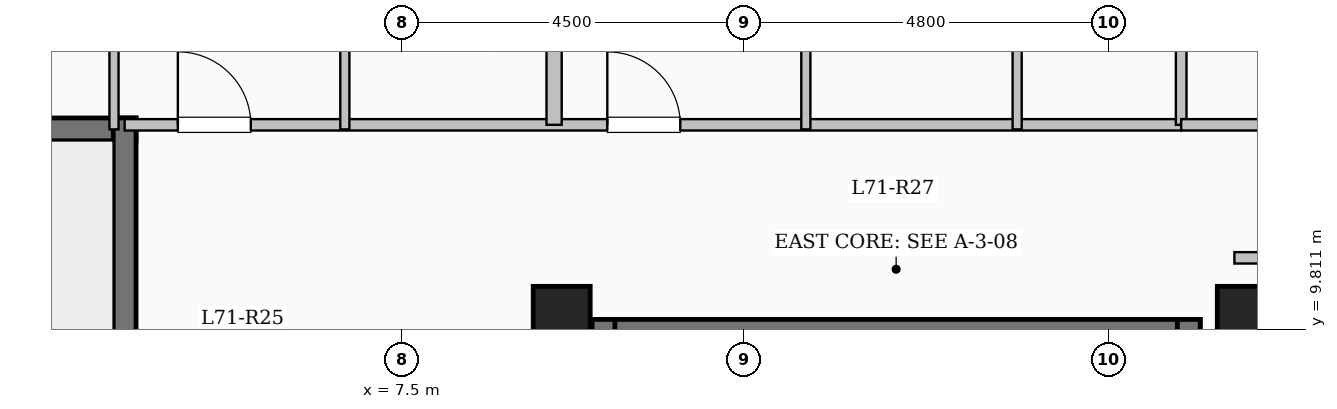
"""IFC4 building model, lengths in metres.
Left out: names, types, materials, properties, quantities, classifications, styles, units other than length and angle.
Written with IfcOpenShell. Run it as: python <this file> out.ifc"""

import sys

from ifc_helpers import new_model, si_unit, direction, frame, frame_2d, origin, origin_2d, place, context, subcontext, project, spatial, rectangle, extrude, element, fill, save


model = new_model("IFC4")
c1 = context("Model", 3, precision=1e-05, world=origin(), true_north=direction((0.0, 1.0)))
c2 = subcontext(c1, "Body", "Model", "MODEL_VIEW")
j1 = project(units=[si_unit("LENGTHUNIT", "METRE"), si_unit("PLANEANGLEUNIT", "RADIAN")], contexts=[c1])
p1 = place(None, origin())
s1 = spatial("IfcSite", under=j1, at=p1, CompositionType="ELEMENT")
p2 = place(p1, origin())
s2 = spatial("IfcBuilding", under=s1, at=p2, CompositionType="ELEMENT")
p3 = place(p2, frame((0.0, 0.0, 261.6)))
s3 = spatial("IfcBuildingStorey", under=s2, at=p3, CompositionType="ELEMENT", Elevation=261.6)
for number, where, z_axis, x_axis in (
    (1, (9.6, 10.0, 0.0), (0.0, 0.0, 1.0), (1.0, 0.0, 0.0)),
    (2, (18.6, 10.0, 0.0), (0.0, 0.0, 1.0), (1.0, 0.0, 0.0)),
):
    element("IfcColumn", number, at=place(p3, frame(where, z_axis=z_axis, x_axis=x_axis)), inside=s3, PredefinedType="COLUMN", context=c2, shape_type="SweptSolid", body=[
        extrude(rectangle(XDim=0.75, YDim=0.75, at=origin_2d()), origin(), (0.0, 0.0, 1.0), 3.35),
    ])
p4 = place(p3, frame((10.0, 9.79, 0.0), z_axis=(0.0, 0.0, 1.0), x_axis=(1.0, 0.0, 0.0)))
e3 = element("IfcWall", 3, at=p4, inside=s3, PredefinedType="SHEAR", context=c2, shape_type="SweptSolid", body=[
    extrude(rectangle(XDim=8.0, YDim=0.3, at=frame_2d((4.0, 0.0))), origin(), (0.0, 0.0, 1.0), 3.35),
])
for number, where, z_axis, x_axis in (
    (4, (10.15, 6.35, 0.0), (0.0, 0.0, 1.0), (0.0, 1.0, 0.0)),
    (5, (17.85, 6.35, 0.0), (0.0, 0.0, 1.0), (0.0, 1.0, 0.0)),
):
    element("IfcWall", number, at=place(p3, frame(where, z_axis=z_axis, x_axis=x_axis)), inside=s3, PredefinedType="SHEAR", context=c2, shape_type="SweptSolid", body=[
        extrude(rectangle(XDim=3.59, YDim=0.3, at=frame_2d((1.795, 0.0))), origin(), (0.0, 0.0, 1.0), 3.35),
    ])
p5 = place(p3, frame((-4.0, 12.44, 0.0), z_axis=(0.0, 0.0, 1.0), x_axis=(1.0, 0.0, 0.0)))
e6 = element("IfcWall", 6, at=p5, inside=s3, PredefinedType="SHEAR", context=c2, shape_type="SweptSolid", body=[
    extrude(rectangle(XDim=8.0, YDim=0.3, at=frame_2d((4.0, 0.0))), origin(), (0.0, 0.0, 1.0), 3.35),
])
p6 = place(p3, frame((3.85, 9.0, 0.0), z_axis=(0.0, 0.0, 1.0), x_axis=(0.0, 1.0, 0.0)))
e7 = element("IfcWall", 7, at=p6, inside=s3, PredefinedType="SHEAR", context=c2, shape_type="SweptSolid", body=[
    extrude(rectangle(XDim=3.59, YDim=0.3, at=frame_2d((1.795, 0.0))), origin(), (0.0, 0.0, 1.0), 3.35),
])
p7 = place(p3, frame((3.85, 12.5, 0.0), z_axis=(0.0, 0.0, 1.0), x_axis=(1.0, 0.0, 0.0)))
e8 = element("IfcWall", 8, at=p7, inside=s3, PredefinedType="PARTITIONING", context=c2, shape_type="SweptSolid", body=[
    extrude(rectangle(XDim=13.9, YDim=0.15, at=frame_2d((6.95, 0.0))), origin(), (0.0, 0.0, 1.0), 3.1),
])
p8 = place(p7, frame((0.7, 0.0, 0.0)))
e9 = element("IfcOpeningElement", 9, at=p8, cuts=e8, PredefinedType="OPENING", context=c2, shape_type="SweptSolid", body=[
    extrude(rectangle(XDim=0.96, YDim=2.15, at=frame_2d((0.48, 1.075))), frame((0.0, 0.085, 0.0), z_axis=(0.0, -1.0, 0.0), x_axis=(1.0, 0.0, 0.0)), (0.0, 0.0, 1.0), 0.17),
])
p9 = place(p7, frame((6.35, 0.0, 0.0)))
e10 = element("IfcOpeningElement", 10, at=p9, cuts=e8, PredefinedType="OPENING", context=c2, shape_type="SweptSolid", body=[
    extrude(rectangle(XDim=0.96, YDim=2.15, at=frame_2d((0.48, 1.075))), frame((0.0, 0.085, 0.0), z_axis=(0.0, -1.0, 0.0), x_axis=(1.0, 0.0, 0.0)), (0.0, 0.0, 1.0), 0.17),
])
p10 = place(p3, frame((9.5, 12.5, 0.0), z_axis=(0.0, 0.0, 1.0), x_axis=(0.0, 1.0, 0.0)))
e11 = element("IfcWall", 11, at=p10, inside=s3, PredefinedType="SOLIDWALL", context=c2, shape_type="SweptSolid", body=[
    extrude(rectangle(XDim=8.77, YDim=0.2, at=frame_2d((4.385, 0.0))), origin(), (0.0, 0.0, 1.0), 3.1),
])
p11 = place(p3, frame((3.71, 12.44, 0.0), z_axis=(0.0, 0.0, 1.0), x_axis=(0.0, 1.0, 0.0)))
e12 = element("IfcWall", 12, at=p11, inside=s3, PredefinedType="PARTITIONING", context=c2, shape_type="SweptSolid", body=[
    extrude(rectangle(XDim=9.94, YDim=0.12, at=frame_2d((4.97, 0.0))), origin(), (0.0, 0.0, 1.0), 3.1),
])
p12 = place(p11, frame((2.735, 0.0, 0.0)))
e13 = element("IfcOpeningElement", 13, at=p12, cuts=e12, PredefinedType="OPENING", context=c2, shape_type="SweptSolid", body=[
    extrude(rectangle(XDim=1.08, YDim=2.15, at=frame_2d((0.54, 1.075))), frame((0.0, 0.07, 0.0), z_axis=(0.0, -1.0, 0.0), x_axis=(1.0, 0.0, 0.0)), (0.0, 0.0, 1.0), 0.14),
])
p13 = place(p3, frame((6.747, 12.44, 0.0), z_axis=(0.0, 0.0, 1.0), x_axis=(0.0, 1.0, 0.0)))
e14 = element("IfcWall", 14, at=p13, inside=s3, PredefinedType="PARTITIONING", context=c2, shape_type="SweptSolid", body=[
    extrude(rectangle(XDim=2.45, YDim=0.12, at=frame_2d((1.225, 0.0))), origin(), (0.0, 0.0, 1.0), 3.1),
])
p14 = place(p3, frame((12.812, 12.44, 0.0), z_axis=(0.0, 0.0, 1.0), x_axis=(0.0, 1.0, 0.0)))
e15 = element("IfcWall", 15, at=p14, inside=s3, PredefinedType="PARTITIONING", context=c2, shape_type="SweptSolid", body=[
    extrude(rectangle(XDim=8.46, YDim=0.12, at=frame_2d((4.23, 0.0))), origin(), (0.0, 0.0, 1.0), 3.1),
])
p15 = place(p14, frame((2.905, 0.0, 0.0)))
e16 = element("IfcOpeningElement", 16, at=p15, cuts=e15, PredefinedType="OPENING", context=c2, shape_type="SweptSolid", body=[
    extrude(rectangle(XDim=1.08, YDim=2.15, at=frame_2d((0.54, 1.075))), frame((0.0, 0.07, 0.0), z_axis=(0.0, -1.0, 0.0), x_axis=(1.0, 0.0, 0.0)), (0.0, 0.0, 1.0), 0.14),
])
p16 = place(p3, frame((15.592, 12.44, 0.0), z_axis=(0.0, 0.0, 1.0), x_axis=(0.0, 1.0, 0.0)))
e17 = element("IfcWall", 17, at=p16, inside=s3, PredefinedType="PARTITIONING", context=c2, shape_type="SweptSolid", body=[
    extrude(rectangle(XDim=2.62, YDim=0.12, at=frame_2d((1.31, 0.0))), origin(), (0.0, 0.0, 1.0), 3.1),
])
p17 = place(p3, frame((18.45, 10.75, 0.0), z_axis=(0.0, 0.0, 1.0), x_axis=(1.0, 0.0, 0.0)))
e18 = element("IfcWall", 18, at=p17, inside=s3, PredefinedType="PARTITIONING", context=c2, shape_type="SweptSolid", body=[
    extrude(rectangle(XDim=4.23, YDim=0.15, at=frame_2d((2.115, 0.0))), origin(), (0.0, 0.0, 1.0), 3.1),
])
p18 = place(p3, frame((17.75, 12.5, 0.0), z_axis=(0.0, 0.0, 1.0), x_axis=(0.0, 1.0, 0.0)))
e19 = element("IfcWall", 19, at=p18, inside=s3, PredefinedType="PARTITIONING", context=c2, shape_type="SweptSolid", body=[
    extrude(rectangle(XDim=5.05, YDim=0.14, at=frame_2d((2.525, 0.0))), origin(), (0.0, 0.0, 1.0), 3.1),
])
p19 = place(p3, frame((17.75, 12.5, 0.0), z_axis=(0.0, 0.0, 1.0), x_axis=(1.0, 0.0, 0.0)))
e20 = element("IfcWall", 20, at=p19, inside=s3, PredefinedType="PARTITIONING", context=c2, shape_type="SweptSolid", body=[
    extrude(rectangle(XDim=4.93, YDim=0.15, at=frame_2d((2.465, 0.0))), origin(), (0.0, 0.0, 1.0), 3.1),
])
p20 = place(p19, frame((1.99, 0.0, 0.0)))
e21 = element("IfcOpeningElement", 21, at=p20, cuts=e20, PredefinedType="OPENING", context=c2, shape_type="SweptSolid", body=[
    extrude(rectangle(XDim=0.95, YDim=2.15, at=frame_2d((0.475, 1.075))), frame((0.0, 0.085, 0.0), z_axis=(0.0, -1.0, 0.0), x_axis=(1.0, 0.0, 0.0)), (0.0, 0.0, 1.0), 0.17),
])
p21 = place(p8, origin())
e22 = element("IfcDoor", 22, at=p21, inside=s3, OperationType="SINGLE_SWING_LEFT", PredefinedType="DOOR", context=c2, shape_type="SweptSolid", body=[
    extrude(rectangle(XDim=0.96, YDim=2.15, at=frame_2d((0.48, 1.075))), frame((0.0, 0.025, 0.0), z_axis=(0.0, -1.0, 0.0), x_axis=(1.0, 0.0, 0.0)), (0.0, 0.0, 1.0), 0.05),
])
fill(e9, e22)
p22 = place(p9, origin())
e23 = element("IfcDoor", 23, at=p22, inside=s3, OperationType="SINGLE_SWING_LEFT", PredefinedType="DOOR", context=c2, shape_type="SweptSolid", body=[
    extrude(rectangle(XDim=0.96, YDim=2.15, at=frame_2d((0.48, 1.075))), frame((0.0, 0.025, 0.0), z_axis=(0.0, -1.0, 0.0), x_axis=(1.0, 0.0, 0.0)), (0.0, 0.0, 1.0), 0.05),
])
fill(e10, e23)
save(model, sys.argv[1])
